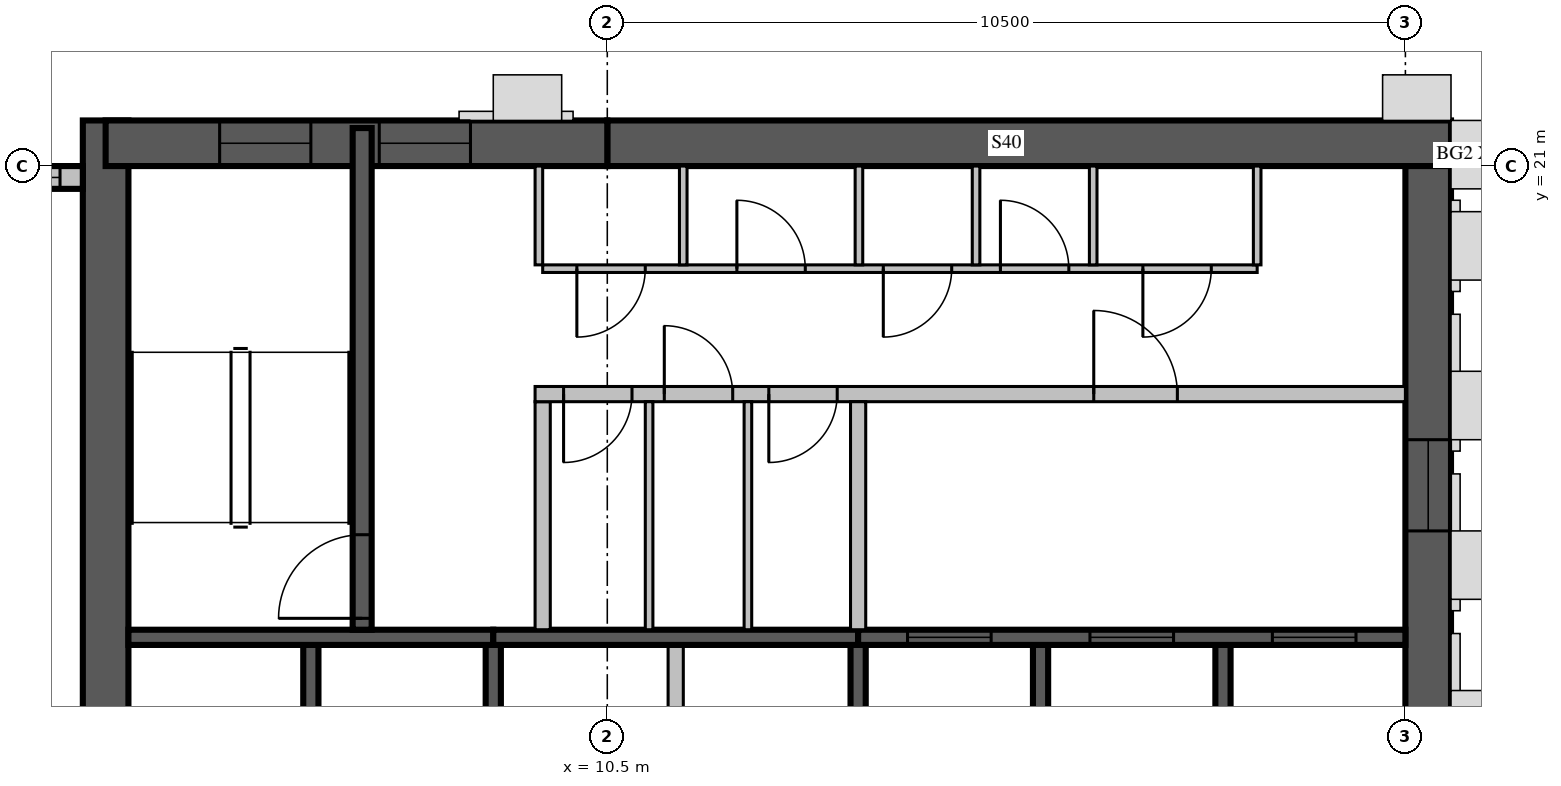
"""IFC4 building model, lengths in metres.
Left out: names, types, materials, properties, quantities, classifications, styles, units other than length and angle.
Written with IfcOpenShell. Run it as: python <this file> out.ifc"""

import sys

from ifc_helpers import new_model, si_unit, direction, frame, frame_2d, origin, place, context, subcontext, project, spatial, rectangle, extrude, source, transform, mapped, element, fill, save


model = new_model("IFC4")
c1 = context("Model", 3, precision=1e-05, world=origin(), true_north=direction((0.0, 1.0)))
c2 = subcontext(c1, "Body", "Model", "MODEL_VIEW")
j1 = project(units=[si_unit("LENGTHUNIT", "METRE"), si_unit("PLANEANGLEUNIT", "RADIAN")], contexts=[c1])
p1 = place(None, origin())
s1 = spatial("IfcSite", under=j1, at=p1, CompositionType="ELEMENT")
p2 = place(p1, origin())
s2 = spatial("IfcBuilding", under=s1, at=p2, CompositionType="ELEMENT")
p3 = place(p2, frame((0.0, 0.0, 319.5)))
s3 = spatial("IfcBuildingStorey", under=s2, at=p3, CompositionType="ELEMENT", Elevation=319.5)
m1 = source(origin(), c2, "Body", "SweptSolid", [
    extrude(rectangle(XDim=17.4, YDim=0.6, at=frame_2d((8.7, 0.0))), origin(), (0.0, 0.0, 1.0), 3.5),
])
p4 = place(p3, frame((3.9, 4.2, 0.0), z_axis=(0.0, 0.0, 1.0), x_axis=(0.0, 1.0, 0.0)))
e1 = element("IfcWall", 1, at=p4, inside=s3, PredefinedType="SHEAR", context=c2, shape_type="MappedRepresentation", body=[
    mapped(m1, transform((0.0, 0.0, 0.0), scale=1.0)),
])
m2 = source(origin(), c2, "Body", "SweptSolid", [
    extrude(rectangle(XDim=2.2, YDim=2.1, at=frame_2d((1.1, 1.05))), frame((0.0, 0.31, 0.0), z_axis=(0.0, -1.0, 0.0), x_axis=(1.0, 0.0, 0.0)), (0.0, 0.0, 1.0), 0.62),
])
p5 = place(p4, frame((4.2, 0.0, 0.0)))
e2 = element("IfcOpeningElement", 2, at=p5, cuts=e1, PredefinedType="OPENING", context=c2, shape_type="MappedRepresentation", body=[
    mapped(m2, transform((0.0, 0.0, 0.0), scale=1.0)),
])
m3 = source(origin(), c2, "Body", "SweptSolid", [
    extrude(rectangle(XDim=11.1, YDim=0.6, at=frame_2d((5.55, 0.0))), origin(), (0.0, 0.0, 1.0), 3.5),
])
p6 = place(p3, frame((10.5, 21.3, 0.0), z_axis=(0.0, 0.0, 1.0), x_axis=(1.0, 0.0, 0.0)))
e3 = element("IfcWall", 3, at=p6, inside=s3, PredefinedType="SHEAR", context=c2, shape_type="MappedRepresentation", body=[
    mapped(m3, transform((0.0, 0.0, 0.0), scale=1.0)),
])
m4 = source(origin(), c2, "Body", "SweptSolid", [
    extrude(rectangle(XDim=10.5, YDim=0.6, at=frame_2d((5.25, 0.0))), origin(), (0.0, 0.0, 1.0), 3.5),
])
p7 = place(p3, frame((21.3, 10.5, 0.0), z_axis=(0.0, 0.0, 1.0), x_axis=(0.0, 1.0, 0.0)))
e4 = element("IfcWall", 4, at=p7, inside=s3, PredefinedType="SHEAR", context=c2, shape_type="MappedRepresentation", body=[
    mapped(m4, transform((0.0, 0.0, 0.0), scale=1.0)),
])
m5 = source(origin(), c2, "Body", "SweptSolid", [
    extrude(rectangle(XDim=1.2, YDim=2.4, at=frame_2d((0.6, 1.2))), frame((0.0, 0.31, 0.0), z_axis=(0.0, -1.0, 0.0), x_axis=(1.0, 0.0, 0.0)), (0.0, 0.0, 1.0), 0.62),
])
p8 = place(p7, frame((5.7, 0.0, 0.6)))
e5 = element("IfcOpeningElement", 5, at=p8, cuts=e4, PredefinedType="OPENING", context=c2, shape_type="MappedRepresentation", body=[
    mapped(m5, transform((0.0, 0.0, 0.0), scale=1.0)),
])
m6 = source(origin(), c2, "Body", "SweptSolid", [
    extrude(rectangle(XDim=6.6, YDim=0.6, at=frame_2d((3.3, 0.0))), origin(), (0.0, 0.0, 1.0), 3.5),
])
p9 = place(p3, frame((3.9, 21.3, 0.0), z_axis=(0.0, 0.0, 1.0), x_axis=(1.0, 0.0, 0.0)))
e6 = element("IfcWall", 6, at=p9, inside=s3, PredefinedType="SHEAR", context=c2, shape_type="MappedRepresentation", body=[
    mapped(m6, transform((0.0, 0.0, 0.0), scale=1.0)),
])
p10 = place(p9, frame((1.5, 0.0, 0.6)))
e7 = element("IfcOpeningElement", 7, at=p10, cuts=e6, PredefinedType="OPENING", context=c2, shape_type="MappedRepresentation", body=[
    mapped(m5, transform((0.0, 0.0, 0.0), scale=1.0)),
])
p11 = place(p9, frame((3.6, 0.0, 0.6)))
e8 = element("IfcOpeningElement", 8, at=p11, cuts=e6, PredefinedType="OPENING", context=c2, shape_type="MappedRepresentation", body=[
    mapped(m5, transform((0.0, 0.0, 0.0), scale=1.0)),
])
m7 = source(origin(), c2, "Body", "SweptSolid", [
    extrude(rectangle(XDim=2.9, YDim=0.3, at=frame_2d((1.45, 0.0))), origin(), (0.0, 0.0, 1.0), 3.1),
])
p12 = place(p3, frame((3.6, 20.85, 0.0), z_axis=(0.0, 0.0, 1.0), x_axis=(-1.0, 0.0, 0.0)))
e9 = element("IfcWall", 9, at=p12, inside=s3, PredefinedType="STANDARD", context=c2, shape_type="MappedRepresentation", body=[
    mapped(m7, transform((0.0, 0.0, 0.0), scale=1.0)),
])
m8 = source(origin(), c2, "Body", "SweptSolid", [
    extrude(rectangle(XDim=2.4, YDim=2.0, at=frame_2d((1.2, 1.0))), frame((0.0, 0.16, 0.0), z_axis=(0.0, -1.0, 0.0), x_axis=(1.0, 0.0, 0.0)), (0.0, 0.0, 1.0), 0.32),
])
p13 = place(p12, frame((0.3, 0.0, 0.6)))
e10 = element("IfcOpeningElement", 10, at=p13, cuts=e9, PredefinedType="OPENING", context=c2, shape_type="MappedRepresentation", body=[
    mapped(m8, transform((0.0, 0.0, 0.0), scale=1.0)),
])
m9 = source(origin(), c2, "Body", "SweptSolid", [
    extrude(rectangle(XDim=3.0, YDim=0.2, at=frame_2d((1.5, 0.0))), origin(), (0.0, 0.0, 1.0), 3.5),
])
p14 = place(p3, frame((6.6, 11.7, 0.0), z_axis=(0.0, 0.0, 1.0), x_axis=(0.0, 1.0, 0.0)))
e11 = element("IfcWall", 11, at=p14, inside=s3, PredefinedType="SOLIDWALL", context=c2, shape_type="MappedRepresentation", body=[
    mapped(m9, transform((0.0, 0.0, 0.0), scale=1.0)),
])
m10 = source(origin(), c2, "Body", "SweptSolid", [
    extrude(rectangle(XDim=3.0, YDim=0.2, at=frame_2d((1.5, 0.0))), origin(), (0.0, 0.0, 1.0), 3.1),
])
for number, where, z_axis, x_axis in (
    (12, (9.0, 11.7, 0.0), (0.0, 0.0, 1.0), (0.0, 1.0, 0.0)),
    (13, (13.8, 11.7, 0.0), (0.0, 0.0, 1.0), (0.0, 1.0, 0.0)),
):
    element("IfcWall", number, at=place(p3, frame(where, z_axis=z_axis, x_axis=x_axis)), inside=s3, PredefinedType="SOLIDWALL", context=c2, shape_type="MappedRepresentation", body=[
        mapped(m10, transform((0.0, 0.0, 0.0), scale=1.0)),
    ])
for number, where, z_axis, x_axis in (
    (14, (16.2, 11.7, 0.0), (0.0, 0.0, 1.0), (0.0, 1.0, 0.0)),
    (15, (18.6, 11.7, 0.0), (0.0, 0.0, 1.0), (0.0, 1.0, 0.0)),
):
    element("IfcWall", number, at=place(p3, frame(where, z_axis=z_axis, x_axis=x_axis)), inside=s3, PredefinedType="SOLIDWALL", context=c2, shape_type="MappedRepresentation", body=[
        mapped(m9, transform((0.0, 0.0, 0.0), scale=1.0)),
    ])
m11 = source(origin(), c2, "Body", "SweptSolid", [
    extrude(rectangle(XDim=3.0, YDim=0.2, at=frame_2d((1.5, 0.0))), origin(), (0.0, 0.0, 1.0), 3.1),
])
p15 = place(p3, frame((11.4, 11.7, 0.0), z_axis=(0.0, 0.0, 1.0), x_axis=(0.0, 1.0, 0.0)))
e16 = element("IfcWall", 16, at=p15, inside=s3, PredefinedType="PARTITIONING", context=c2, shape_type="MappedRepresentation", body=[
    mapped(m11, transform((0.0, 0.0, 0.0), scale=1.0)),
])
m12 = source(origin(), c2, "Body", "SweptSolid", [
    extrude(rectangle(XDim=4.8, YDim=0.2, at=frame_2d((2.4, 0.0))), origin(), (0.0, 0.0, 1.0), 3.5),
])
p16 = place(p3, frame((4.2, 14.8, 0.0), z_axis=(0.0, 0.0, 1.0), x_axis=(1.0, 0.0, 0.0)))
e17 = element("IfcWall", 17, at=p16, inside=s3, PredefinedType="SOLIDWALL", context=c2, shape_type="MappedRepresentation", body=[
    mapped(m12, transform((0.0, 0.0, 0.0), scale=1.0)),
])
m13 = source(origin(), c2, "Body", "SweptSolid", [
    extrude(rectangle(XDim=4.8, YDim=0.2, at=frame_2d((2.4, 0.0))), origin(), (0.0, 0.0, 1.0), 3.1),
])
p17 = place(p3, frame((9.0, 14.8, 0.0), z_axis=(0.0, 0.0, 1.0), x_axis=(1.0, 0.0, 0.0)))
e18 = element("IfcWall", 18, at=p17, inside=s3, PredefinedType="SOLIDWALL", context=c2, shape_type="MappedRepresentation", body=[
    mapped(m13, transform((0.0, 0.0, 0.0), scale=1.0)),
])
m14 = source(origin(), c2, "Body", "SweptSolid", [
    extrude(rectangle(XDim=7.2, YDim=0.2, at=frame_2d((3.6, 0.0))), origin(), (0.0, 0.0, 1.0), 3.5),
])
p18 = place(p3, frame((13.8, 14.8, 0.0), z_axis=(0.0, 0.0, 1.0), x_axis=(1.0, 0.0, 0.0)))
e19 = element("IfcWall", 19, at=p18, inside=s3, PredefinedType="SOLIDWALL", context=c2, shape_type="MappedRepresentation", body=[
    mapped(m14, transform((0.0, 0.0, 0.0), scale=1.0)),
])
m15 = source(origin(), c2, "Body", "SweptSolid", [
    extrude(rectangle(XDim=1.1, YDim=2.1, at=frame_2d((0.55, 1.05))), frame((0.0, 0.11, 0.0), z_axis=(0.0, -1.0, 0.0), x_axis=(1.0, 0.0, 0.0)), (0.0, 0.0, 1.0), 0.22),
])
p19 = place(p18, frame((0.65, 0.0, 0.0)))
e20 = element("IfcOpeningElement", 20, at=p19, cuts=e19, PredefinedType="OPENING", context=c2, shape_type="MappedRepresentation", body=[
    mapped(m15, transform((0.0, 0.0, 0.0), scale=1.0)),
])
p20 = place(p18, frame((3.05, 0.0, 0.0)))
e21 = element("IfcOpeningElement", 21, at=p20, cuts=e19, PredefinedType="OPENING", context=c2, shape_type="MappedRepresentation", body=[
    mapped(m15, transform((0.0, 0.0, 0.0), scale=1.0)),
])
p21 = place(p18, frame((5.45, 0.0, 0.0)))
e22 = element("IfcOpeningElement", 22, at=p21, cuts=e19, PredefinedType="OPENING", context=c2, shape_type="MappedRepresentation", body=[
    mapped(m15, transform((0.0, 0.0, 0.0), scale=1.0)),
])
m16 = source(origin(), c2, "Body", "SweptSolid", [
    extrude(rectangle(XDim=6.6, YDim=0.25, at=frame_2d((3.3, 0.0))), origin(), (0.0, 0.0, 1.0), 3.1),
])
p22 = place(p3, frame((7.275, 14.9, 0.0), z_axis=(0.0, 0.0, 1.0), x_axis=(0.0, 1.0, 0.0)))
e23 = element("IfcWall", 23, at=p22, inside=s3, PredefinedType="SOLIDWALL", context=c2, shape_type="MappedRepresentation", body=[
    mapped(m16, transform((0.0, 0.0, 0.0), scale=1.0)),
])
m17 = source(origin(), c2, "Body", "SweptSolid", [
    extrude(rectangle(XDim=1.1, YDim=2.1, at=frame_2d((0.55, 1.05))), frame((0.0, 0.135, 0.0), z_axis=(0.0, -1.0, 0.0), x_axis=(1.0, 0.0, 0.0)), (0.0, 0.0, 1.0), 0.27),
])
p23 = place(p22, frame((0.15, 0.0, 0.0)))
e24 = element("IfcOpeningElement", 24, at=p23, cuts=e23, PredefinedType="OPENING", context=c2, shape_type="MappedRepresentation", body=[
    mapped(m17, transform((0.0, 0.0, 0.0), scale=1.0)),
])
p24 = place(p3, frame((9.65, 14.9, 0.0), z_axis=(0.0, 0.0, 1.0), x_axis=(0.0, 1.0, 0.0)))
e25 = element("IfcWall", 25, at=p24, inside=s3, PredefinedType="PARTITIONING", context=c2, shape_type="MappedRepresentation", body=[
    mapped(m11, transform((0.0, 0.0, 0.0), scale=1.0)),
])
m18 = source(origin(), c2, "Body", "SweptSolid", [
    extrude(rectangle(XDim=11.45, YDim=0.2, at=frame_2d((5.725, 0.0))), origin(), (0.0, 0.0, 1.0), 3.1),
])
p25 = place(p3, frame((9.55, 18.0, 0.0), z_axis=(0.0, 0.0, 1.0), x_axis=(1.0, 0.0, 0.0)))
e26 = element("IfcWall", 26, at=p25, inside=s3, PredefinedType="PARTITIONING", context=c2, shape_type="MappedRepresentation", body=[
    mapped(m18, transform((0.0, 0.0, 0.0), scale=1.0)),
])
m19 = source(origin(), c2, "Body", "SweptSolid", [
    extrude(rectangle(XDim=0.9, YDim=2.1, at=frame_2d((0.45, 1.05))), frame((0.0, 0.11, 0.0), z_axis=(0.0, -1.0, 0.0), x_axis=(1.0, 0.0, 0.0)), (0.0, 0.0, 1.0), 0.22),
])
p26 = place(p25, frame((0.375, 0.0, 0.0)))
e27 = element("IfcOpeningElement", 27, at=p26, cuts=e26, PredefinedType="OPENING", context=c2, shape_type="MappedRepresentation", body=[
    mapped(m19, transform((0.0, 0.0, 0.0), scale=1.0)),
])
p27 = place(p25, frame((1.7, 0.0, 0.0)))
e28 = element("IfcOpeningElement", 28, at=p27, cuts=e26, PredefinedType="OPENING", context=c2, shape_type="MappedRepresentation", body=[
    mapped(m19, transform((0.0, 0.0, 0.0), scale=1.0)),
])
p28 = place(p25, frame((3.075, 0.0, 0.0)))
e29 = element("IfcOpeningElement", 29, at=p28, cuts=e26, PredefinedType="OPENING", context=c2, shape_type="MappedRepresentation", body=[
    mapped(m19, transform((0.0, 0.0, 0.0), scale=1.0)),
])
p29 = place(p25, frame((7.35, 0.0, 0.0)))
e30 = element("IfcOpeningElement", 30, at=p29, cuts=e26, PredefinedType="OPENING", context=c2, shape_type="MappedRepresentation", body=[
    mapped(m15, transform((0.0, 0.0, 0.0), scale=1.0)),
])
m20 = source(origin(), c2, "Body", "SweptSolid", [
    extrude(rectangle(XDim=9.4, YDim=0.1, at=frame_2d((4.7, 0.0))), origin(), (0.0, 0.0, 1.0), 3.1),
])
p30 = place(p3, frame((9.65, 19.65, 0.0), z_axis=(0.0, 0.0, 1.0), x_axis=(1.0, 0.0, 0.0)))
e31 = element("IfcWall", 31, at=p30, inside=s3, PredefinedType="PARTITIONING", context=c2, shape_type="MappedRepresentation", body=[
    mapped(m20, transform((0.0, 0.0, 0.0), scale=1.0)),
])
m21 = source(origin(), c2, "Body", "SweptSolid", [
    extrude(rectangle(XDim=0.9, YDim=2.1, at=frame_2d((0.45, 1.05))), frame((0.0, 0.06, 0.0), z_axis=(0.0, -1.0, 0.0), x_axis=(1.0, 0.0, 0.0)), (0.0, 0.0, 1.0), 0.12),
])
p31 = place(p30, frame((0.45, 0.0, 0.0)))
e32 = element("IfcOpeningElement", 32, at=p31, cuts=e31, PredefinedType="OPENING", context=c2, shape_type="MappedRepresentation", body=[
    mapped(m21, transform((0.0, 0.0, 0.0), scale=1.0)),
])
p32 = place(p30, frame((2.555, 0.0, 0.0)))
e33 = element("IfcOpeningElement", 33, at=p32, cuts=e31, PredefinedType="OPENING", context=c2, shape_type="MappedRepresentation", body=[
    mapped(m21, transform((0.0, 0.0, 0.0), scale=1.0)),
])
p33 = place(p30, frame((4.481, 0.0, 0.0)))
e34 = element("IfcOpeningElement", 34, at=p33, cuts=e31, PredefinedType="OPENING", context=c2, shape_type="MappedRepresentation", body=[
    mapped(m21, transform((0.0, 0.0, 0.0), scale=1.0)),
])
p34 = place(p30, frame((6.022, 0.0, 0.0)))
e35 = element("IfcOpeningElement", 35, at=p34, cuts=e31, PredefinedType="OPENING", context=c2, shape_type="MappedRepresentation", body=[
    mapped(m21, transform((0.0, 0.0, 0.0), scale=1.0)),
])
p35 = place(p30, frame((7.896, 0.0, 0.0)))
e36 = element("IfcOpeningElement", 36, at=p35, cuts=e31, PredefinedType="OPENING", context=c2, shape_type="MappedRepresentation", body=[
    mapped(m21, transform((0.0, 0.0, 0.0), scale=1.0)),
])
m22 = source(origin(), c2, "Body", "SweptSolid", [
    extrude(rectangle(XDim=1.3, YDim=0.1, at=frame_2d((0.65, 0.0))), origin(), (0.0, 0.0, 1.0), 3.1),
])
for number, where, z_axis, x_axis in (
    (37, (11.499, 19.7, 0.0), (0.0, 0.0, 1.0), (0.0, 1.0, 0.0)),
    (38, (13.811, 19.7, 0.0), (0.0, 0.0, 1.0), (0.0, 1.0, 0.0)),
    (39, (15.352, 19.7, 0.0), (0.0, 0.0, 1.0), (0.0, 1.0, 0.0)),
    (40, (16.893, 19.7, 0.0), (0.0, 0.0, 1.0), (0.0, 1.0, 0.0)),
    (41, (9.6, 19.7, 0.0), (0.0, 0.0, 1.0), (0.0, 1.0, 0.0)),
    (42, (19.05, 19.7, 0.0), (0.0, 0.0, 1.0), (0.0, 1.0, 0.0)),
):
    element("IfcWall", number, at=place(p3, frame(where, z_axis=z_axis, x_axis=x_axis)), inside=s3, PredefinedType="PARTITIONING", context=c2, shape_type="MappedRepresentation", body=[
        mapped(m22, transform((0.0, 0.0, 0.0), scale=1.0)),
    ])
p36 = place(p3, frame((13.8, 14.9, 0.0), z_axis=(0.0, 0.0, 1.0), x_axis=(0.0, 1.0, 0.0)))
e43 = element("IfcWall", 43, at=p36, inside=s3, PredefinedType="PARTITIONING", context=c2, shape_type="MappedRepresentation", body=[
    mapped(m11, transform((0.0, 0.0, 0.0), scale=1.0)),
])
m23 = source(origin(), c2, "Body", "SweptSolid", [
    extrude(rectangle(XDim=3.0, YDim=0.1, at=frame_2d((1.5, 0.0))), origin(), (0.0, 0.0, 1.0), 3.1),
])
for number, where, z_axis, x_axis in (
    (44, (11.05, 14.9, 0.0), (0.0, 0.0, 1.0), (0.0, 1.0, 0.0)),
    (45, (12.35, 14.9, 0.0), (0.0, 0.0, 1.0), (0.0, 1.0, 0.0)),
):
    element("IfcWall", number, at=place(p3, frame(where, z_axis=z_axis, x_axis=x_axis)), inside=s3, PredefinedType="PARTITIONING", context=c2, shape_type="MappedRepresentation", body=[
        mapped(m23, transform((0.0, 0.0, 0.0), scale=1.0)),
    ])
m24 = source(origin(), c2, "Body", "SweptSolid", [
    extrude(rectangle(XDim=2.4, YDim=2.0, at=frame_2d((1.2, 1.0))), frame((0.0, 0.03, 0.0), z_axis=(0.0, -1.0, 0.0), x_axis=(1.0, 0.0, 0.0)), (0.0, 0.0, 1.0), 0.06),
])
p37 = place(p13, origin())
e46 = element("IfcWindow", 46, at=p37, inside=s3, PartitioningType="SINGLE_PANEL", PredefinedType="WINDOW", context=c2, shape_type="MappedRepresentation", body=[
    mapped(m24, transform((0.0, 0.0, 0.0), scale=1.0)),
])
fill(e10, e46)
m25 = source(origin(), c2, "Body", "SweptSolid", [
    extrude(rectangle(XDim=1.1, YDim=2.1, at=frame_2d((0.55, 1.05))), frame((0.0, 0.025, 0.0), z_axis=(0.0, -1.0, 0.0), x_axis=(1.0, 0.0, 0.0)), (0.0, 0.0, 1.0), 0.05),
])
p38 = place(p19, origin())
e47 = element("IfcDoor", 47, at=p38, inside=s3, OperationType="SLIDING_TO_LEFT", PredefinedType="DOOR", context=c2, shape_type="MappedRepresentation", body=[
    mapped(m25, transform((0.0, 0.0, 0.0), scale=1.0)),
])
fill(e20, e47)
p39 = place(p20, origin())
e48 = element("IfcDoor", 48, at=p39, inside=s3, OperationType="SLIDING_TO_LEFT", PredefinedType="DOOR", context=c2, shape_type="MappedRepresentation", body=[
    mapped(m25, transform((0.0, 0.0, 0.0), scale=1.0)),
])
fill(e21, e48)
p40 = place(p21, origin())
e49 = element("IfcDoor", 49, at=p40, inside=s3, OperationType="SLIDING_TO_LEFT", PredefinedType="DOOR", context=c2, shape_type="MappedRepresentation", body=[
    mapped(m25, transform((0.0, 0.0, 0.0), scale=1.0)),
])
fill(e22, e49)
p41 = place(p23, origin())
e50 = element("IfcDoor", 50, at=p41, inside=s3, OperationType="SINGLE_SWING_LEFT", PredefinedType="DOOR", context=c2, shape_type="MappedRepresentation", body=[
    mapped(m25, transform((0.0, 0.0, 0.0), scale=1.0)),
])
fill(e24, e50)
m26 = source(origin(), c2, "Body", "SweptSolid", [
    extrude(rectangle(XDim=0.9, YDim=2.1, at=frame_2d((0.45, 1.05))), frame((0.0, 0.025, 0.0), z_axis=(0.0, -1.0, 0.0), x_axis=(1.0, 0.0, 0.0)), (0.0, 0.0, 1.0), 0.05),
])
p42 = place(p26, origin())
e51 = element("IfcDoor", 51, at=p42, inside=s3, OperationType="SINGLE_SWING_RIGHT", PredefinedType="DOOR", context=c2, shape_type="MappedRepresentation", body=[
    mapped(m26, transform((0.0, 0.0, 0.0), scale=1.0)),
])
fill(e27, e51)
p43 = place(p27, origin())
e52 = element("IfcDoor", 52, at=p43, inside=s3, OperationType="SINGLE_SWING_LEFT", PredefinedType="DOOR", context=c2, shape_type="MappedRepresentation", body=[
    mapped(m26, transform((0.0, 0.0, 0.0), scale=1.0)),
])
fill(e28, e52)
p44 = place(p28, origin())
e53 = element("IfcDoor", 53, at=p44, inside=s3, OperationType="SINGLE_SWING_RIGHT", PredefinedType="DOOR", context=c2, shape_type="MappedRepresentation", body=[
    mapped(m26, transform((0.0, 0.0, 0.0), scale=1.0)),
])
fill(e29, e53)
p45 = place(p29, origin())
e54 = element("IfcDoor", 54, at=p45, inside=s3, OperationType="SINGLE_SWING_LEFT", PredefinedType="DOOR", context=c2, shape_type="MappedRepresentation", body=[
    mapped(m25, transform((0.0, 0.0, 0.0), scale=1.0)),
])
fill(e30, e54)
p46 = place(p31, origin())
e55 = element("IfcDoor", 55, at=p46, inside=s3, OperationType="SINGLE_SWING_RIGHT", PredefinedType="DOOR", context=c2, shape_type="MappedRepresentation", body=[
    mapped(m26, transform((0.0, 0.0, 0.0), scale=1.0)),
])
fill(e32, e55)
p47 = place(p32, origin())
e56 = element("IfcDoor", 56, at=p47, inside=s3, OperationType="SINGLE_SWING_LEFT", PredefinedType="DOOR", context=c2, shape_type="MappedRepresentation", body=[
    mapped(m26, transform((0.0, 0.0, 0.0), scale=1.0)),
])
fill(e33, e56)
p48 = place(p33, origin())
e57 = element("IfcDoor", 57, at=p48, inside=s3, OperationType="SINGLE_SWING_RIGHT", PredefinedType="DOOR", context=c2, shape_type="MappedRepresentation", body=[
    mapped(m26, transform((0.0, 0.0, 0.0), scale=1.0)),
])
fill(e34, e57)
p49 = place(p34, origin())
e58 = element("IfcDoor", 58, at=p49, inside=s3, OperationType="SINGLE_SWING_LEFT", PredefinedType="DOOR", context=c2, shape_type="MappedRepresentation", body=[
    mapped(m26, transform((0.0, 0.0, 0.0), scale=1.0)),
])
fill(e35, e58)
p50 = place(p35, origin())
e59 = element("IfcDoor", 59, at=p50, inside=s3, OperationType="SINGLE_SWING_RIGHT", PredefinedType="DOOR", context=c2, shape_type="MappedRepresentation", body=[
    mapped(m26, transform((0.0, 0.0, 0.0), scale=1.0)),
])
fill(e36, e59)
m27 = source(origin(), c2, "Body", "SweptSolid", [
    extrude(rectangle(XDim=1.2, YDim=2.4, at=frame_2d((0.6, 1.2))), frame((0.0, 0.03, 0.0), z_axis=(0.0, -1.0, 0.0), x_axis=(1.0, 0.0, 0.0)), (0.0, 0.0, 1.0), 0.06),
])
p51 = place(p8, origin())
e60 = element("IfcWindow", 60, at=p51, inside=s3, PartitioningType="SINGLE_PANEL", PredefinedType="WINDOW", context=c2, shape_type="MappedRepresentation", body=[
    mapped(m27, transform((0.0, 0.0, 0.0), scale=1.0)),
])
fill(e5, e60)
p52 = place(p10, origin())
e61 = element("IfcWindow", 61, at=p52, inside=s3, PartitioningType="SINGLE_PANEL", PredefinedType="WINDOW", context=c2, shape_type="MappedRepresentation", body=[
    mapped(m27, transform((0.0, 0.0, 0.0), scale=1.0)),
])
fill(e7, e61)
p53 = place(p11, origin())
e62 = element("IfcWindow", 62, at=p53, inside=s3, PartitioningType="SINGLE_PANEL", PredefinedType="WINDOW", context=c2, shape_type="MappedRepresentation", body=[
    mapped(m27, transform((0.0, 0.0, 0.0), scale=1.0)),
])
fill(e8, e62)
save(model, sys.argv[1])
